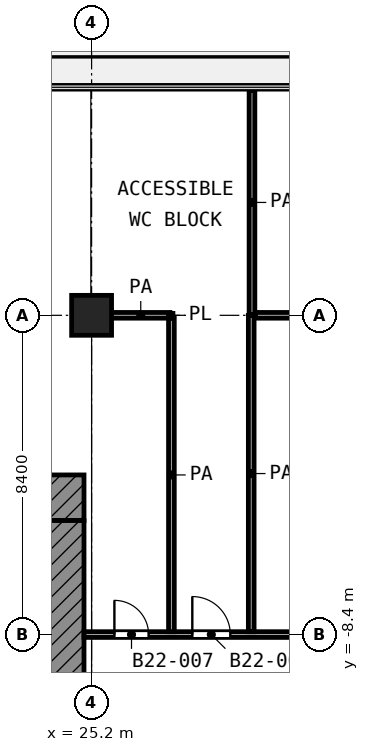
"""IFC4 building model, lengths in metres.
Left out: names, types, materials, properties, quantities, classifications, styles, units other than length and angle.
Written with IfcOpenShell. Run it as: python <this file> out.ifc"""

import sys

from ifc_helpers import new_model, si_unit, direction, frame, frame_2d, origin, origin_2d, place, context, subcontext, project, spatial, rectangle, extrude, element, fill, save


model = new_model("IFC4")
c1 = context("Model", 3, precision=1e-05, world=origin(), true_north=direction((0.0, 1.0)))
c2 = subcontext(c1, "Body", "Model", "MODEL_VIEW")
j1 = project(units=[si_unit("LENGTHUNIT", "METRE"), si_unit("PLANEANGLEUNIT", "RADIAN")], contexts=[c1])
p1 = place(None, origin())
s1 = spatial("IfcSite", under=j1, at=p1, CompositionType="ELEMENT")
p2 = place(p1, origin())
s2 = spatial("IfcBuilding", under=s1, at=p2, CompositionType="ELEMENT")
p3 = place(p2, frame((0.0, 0.0, 98.8)))
s3 = spatial("IfcBuildingStorey", under=s2, at=p3, CompositionType="ELEMENT", Elevation=98.8)
p4 = place(p3, frame((25.2, 0.0, 0.0), z_axis=(0.0, 0.0, 1.0), x_axis=(1.0, 0.0, 0.0)))
e1 = element("IfcColumn", 1, at=p4, inside=s3, PredefinedType="COLUMN", context=c2, shape_type="SweptSolid", body=[
    extrude(rectangle(XDim=1.05, YDim=1.05, at=origin_2d()), origin(), (0.0, 0.0, 1.0), 4.2),
])
p5 = place(p3, frame((4.2, -4.8, 0.0), z_axis=(0.0, 0.0, 1.0), x_axis=(1.0, 0.0, 0.0)))
e2 = element("IfcWall", 2, at=p5, inside=s3, PredefinedType="SHEAR", context=c2, shape_type="SweptSolid", body=[
    extrude(rectangle(XDim=20.8, YDim=1.2, at=frame_2d((10.4, 0.0))), origin(), (0.0, 0.0, 1.0), 3.6),
])
p6 = place(p5, frame((1.95, 0.0, 0.0)))
e3 = element("IfcOpeningElement", 3, at=p6, cuts=e2, PredefinedType="OPENING", context=c2, shape_type="SweptSolid", body=[
    extrude(rectangle(XDim=1.1, YDim=2.1, at=frame_2d((0.55, 1.05))), frame((0.0, 0.61, 0.0), z_axis=(0.0, -1.0, 0.0), x_axis=(1.0, 0.0, 0.0)), (0.0, 0.0, 1.0), 1.22),
])
p7 = place(p5, frame((17.95, 0.0, 0.0)))
e4 = element("IfcOpeningElement", 4, at=p7, cuts=e2, PredefinedType="OPENING", context=c2, shape_type="SweptSolid", body=[
    extrude(rectangle(XDim=1.1, YDim=2.1, at=frame_2d((0.55, 1.05))), frame((0.0, 0.61, 0.0), z_axis=(0.0, -1.0, 0.0), x_axis=(1.0, 0.0, 0.0)), (0.0, 0.0, 1.0), 1.22),
])
p8 = place(p3, frame((24.5, -24.0, 0.0), z_axis=(0.0, 0.0, 1.0), x_axis=(0.0, 1.0, 0.0)))
e5 = element("IfcWall", 5, at=p8, inside=s3, PredefinedType="SHEAR", context=c2, shape_type="SweptSolid", body=[
    extrude(rectangle(XDim=18.6, YDim=1.0, at=frame_2d((9.3, 0.0))), origin(), (0.0, 0.0, 1.0), 3.6),
])
p9 = place(p8, frame((10.5, 0.0, 0.0)))
e6 = element("IfcOpeningElement", 6, at=p9, cuts=e5, PredefinedType="OPENING", context=c2, shape_type="SweptSolid", body=[
    extrude(rectangle(XDim=1.8, YDim=2.1, at=frame_2d((0.9, 1.05))), frame((0.0, 0.51, 0.0), z_axis=(0.0, -1.0, 0.0), x_axis=(1.0, 0.0, 0.0)), (0.0, 0.0, 1.0), 1.02),
])
p10 = place(p3, frame((27.22, 0.0, 0.0), z_axis=(0.0, 0.0, 1.0), x_axis=(1.0, 0.0, 0.0)))
e7 = element("IfcWall", 7, at=p10, inside=s3, PredefinedType="PARTITIONING", context=c2, shape_type="SweptSolid", body=[
    extrude(rectangle(XDim=0.12, YDim=0.1, at=frame_2d((0.06, 0.0))), origin(), (0.0, 0.0, 1.0), 3.6),
])
p11 = place(p3, frame((25.0, -8.4, 0.0), z_axis=(0.0, 0.0, 1.0), x_axis=(1.0, 0.0, 0.0)))
e8 = element("IfcWall", 8, at=p11, inside=s3, PredefinedType="PARTITIONING", context=c2, shape_type="SweptSolid", body=[
    extrude(rectangle(XDim=15.182, YDim=0.15, at=frame_2d((7.591, 0.0))), origin(), (0.0, 0.0, 1.0), 3.6),
])
p12 = place(p11, frame((0.8, 0.0, 0.0)))
e9 = element("IfcOpeningElement", 9, at=p12, cuts=e8, PredefinedType="OPENING", context=c2, shape_type="SweptSolid", body=[
    extrude(rectangle(XDim=0.9, YDim=2.1, at=frame_2d((0.45, 1.05))), frame((0.0, 0.085, 0.0), z_axis=(0.0, -1.0, 0.0), x_axis=(1.0, 0.0, 0.0)), (0.0, 0.0, 1.0), 0.17),
])
p13 = place(p11, frame((2.85, 0.0, 0.0)))
e10 = element("IfcOpeningElement", 10, at=p13, cuts=e8, PredefinedType="OPENING", context=c2, shape_type="SweptSolid", body=[
    extrude(rectangle(XDim=1.0, YDim=2.1, at=frame_2d((0.5, 1.05))), frame((0.0, 0.085, 0.0), z_axis=(0.0, -1.0, 0.0), x_axis=(1.0, 0.0, 0.0)), (0.0, 0.0, 1.0), 0.17),
])
p14 = place(p11, frame((9.241, 0.0, 0.0)))
e11 = element("IfcOpeningElement", 11, at=p14, cuts=e8, PredefinedType="OPENING", context=c2, shape_type="SweptSolid", body=[
    extrude(rectangle(XDim=1.5, YDim=2.1, at=frame_2d((0.75, 1.05))), frame((0.0, 0.085, 0.0), z_axis=(0.0, -1.0, 0.0), x_axis=(1.0, 0.0, 0.0)), (0.0, 0.0, 1.0), 0.17),
])
p15 = place(p3, frame((25.727, 0.0, 0.0), z_axis=(0.0, 0.0, 1.0), x_axis=(1.0, 0.0, 0.0)))
e12 = element("IfcWall", 12, at=p15, inside=s3, PredefinedType="PARTITIONING", context=c2, shape_type="SweptSolid", body=[
    extrude(rectangle(XDim=1.533, YDim=0.15, at=frame_2d((0.767, 0.0))), origin(), (0.0, 0.0, 1.0), 3.6),
])
p16 = place(p3, frame((29.515, 0.0, 0.0), z_axis=(0.0, 0.0, 1.0), x_axis=(1.0, 0.0, 0.0)))
e13 = element("IfcWall", 13, at=p16, inside=s3, PredefinedType="PARTITIONING", context=c2, shape_type="SweptSolid", body=[
    extrude(rectangle(XDim=12.41, YDim=0.15, at=frame_2d((6.205, 0.0))), origin(), (0.0, 0.0, 1.0), 3.6),
])
p17 = place(p16, frame((5.705, 0.0, 0.0)))
e14 = element("IfcOpeningElement", 14, at=p17, cuts=e13, PredefinedType="OPENING", context=c2, shape_type="SweptSolid", body=[
    extrude(rectangle(XDim=1.0, YDim=2.1, at=frame_2d((0.5, 1.05))), frame((0.0, 0.085, 0.0), z_axis=(0.0, -1.0, 0.0), x_axis=(1.0, 0.0, 0.0)), (0.0, 0.0, 1.0), 0.17),
])
p18 = place(p3, frame((27.3, -8.325, 0.0), z_axis=(0.0, 0.0, 1.0), x_axis=(0.0, 1.0, 0.0)))
e15 = element("IfcWall", 15, at=p18, inside=s3, PredefinedType="PARTITIONING", context=c2, shape_type="SweptSolid", body=[
    extrude(rectangle(XDim=8.25, YDim=0.15, at=frame_2d((4.125, 0.0))), origin(), (0.0, 0.0, 1.0), 3.6),
])
p19 = place(p3, frame((29.4, -8.325, 0.0), z_axis=(0.0, 0.0, 1.0), x_axis=(0.0, 1.0, 0.0)))
e16 = element("IfcWall", 16, at=p19, inside=s3, PredefinedType="PARTITIONING", context=c2, shape_type="SweptSolid", body=[
    extrude(rectangle(XDim=8.323, YDim=0.15, at=frame_2d((4.162, 0.0))), origin(), (0.0, 0.0, 1.0), 3.6),
])
p20 = place(p3, frame((29.42, 0.02, 0.0), z_axis=(0.0, 0.0, 1.0), x_axis=(0.0, 1.0, 0.0)))
e17 = element("IfcWall", 17, at=p20, inside=s3, PredefinedType="PARTITIONING", context=c2, shape_type="SweptSolid", body=[
    extrude(rectangle(XDim=5.9, YDim=0.15, at=frame_2d((2.95, 0.0))), origin(), (0.0, 0.0, 1.0), 3.6),
])
p21 = place(p12, origin())
e18 = element("IfcDoor", 18, at=p21, inside=s3, OperationType="SINGLE_SWING_LEFT", PredefinedType="DOOR", context=c2, shape_type="SweptSolid", body=[
    extrude(rectangle(XDim=0.9, YDim=2.1, at=frame_2d((0.45, 1.05))), frame((0.0, 0.025, 0.0), z_axis=(0.0, -1.0, 0.0), x_axis=(1.0, 0.0, 0.0)), (0.0, 0.0, 1.0), 0.05),
])
fill(e9, e18)
p22 = place(p13, origin())
e19 = element("IfcDoor", 19, at=p22, inside=s3, OperationType="SINGLE_SWING_LEFT", PredefinedType="DOOR", context=c2, shape_type="SweptSolid", body=[
    extrude(rectangle(XDim=1.0, YDim=2.1, at=frame_2d((0.5, 1.05))), frame((0.0, 0.025, 0.0), z_axis=(0.0, -1.0, 0.0), x_axis=(1.0, 0.0, 0.0)), (0.0, 0.0, 1.0), 0.05),
])
fill(e10, e19)
save(model, sys.argv[1])
